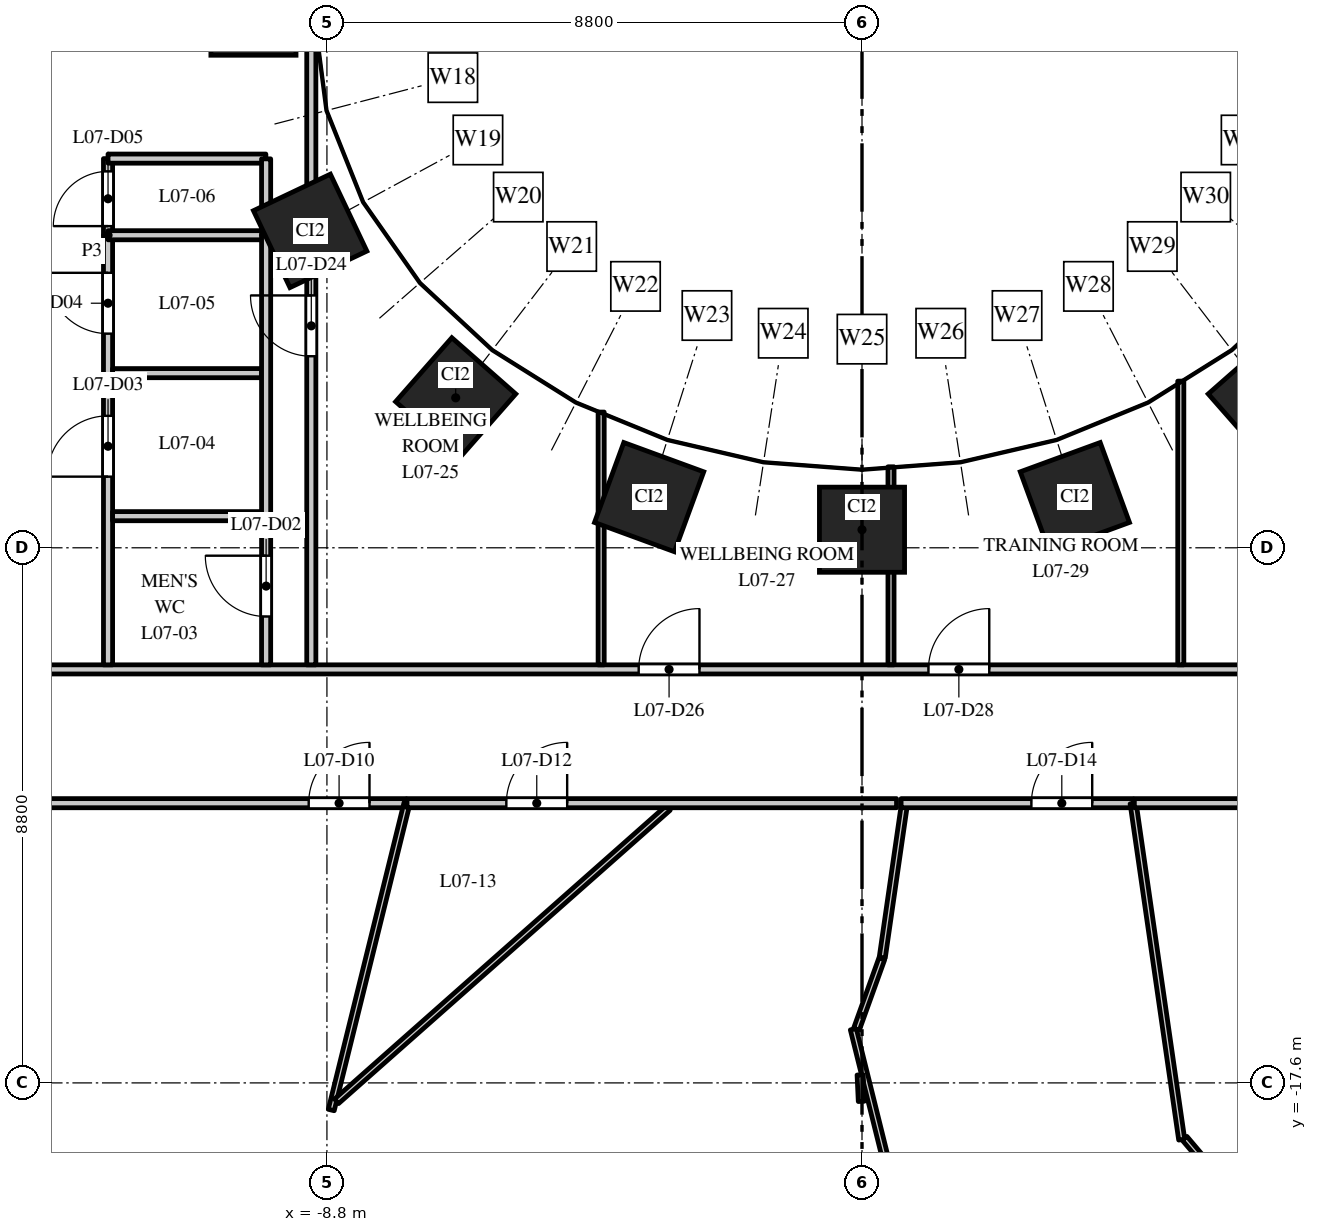
"""IFC4 building model, lengths in metres.
Left out: names, types, materials, properties, quantities, classifications, styles, units other than length and angle.
Written with IfcOpenShell. Run it as: python <this file> out.ifc"""

import sys

from ifc_helpers import new_model, si_unit, direction, frame, frame_2d, origin, origin_2d, place, context, subcontext, project, spatial, rectangle, extrude, element, fill, save


model = new_model("IFC4")
c1 = context("Model", 3, precision=1e-05, world=origin(), true_north=direction((0.0, 1.0)))
c2 = subcontext(c1, "Body", "Model", "MODEL_VIEW")
j1 = project(units=[si_unit("LENGTHUNIT", "METRE"), si_unit("PLANEANGLEUNIT", "RADIAN")], contexts=[c1])
p1 = place(None, origin())
s1 = spatial("IfcSite", under=j1, at=p1, CompositionType="ELEMENT")
p2 = place(p1, origin())
s2 = spatial("IfcBuilding", under=s1, at=p2, CompositionType="ELEMENT")
p3 = place(p2, frame((0.0, 0.0, 38.5)))
s3 = spatial("IfcBuildingStorey", under=s2, at=p3, CompositionType="ELEMENT", Elevation=38.5)
for number, where, z_axis, x_axis in (
    (1, (-10.008, 0.0, 0.0), (0.0, 0.0, 1.0), (0.0, -1.0, 0.0)),
    (2, (-9.076, -3.588, 0.0), (0.0, 0.0, 1.0), (0.429, -0.903, 0.0)),
    (3, (-6.682, -6.334, 0.0), (0.0, 0.0, 1.0), (0.751, -0.66, 0.0)),
    (4, (-3.501, -7.967, 0.0), (0.0, 0.0, 1.0), (0.939, -0.344, 0.0)),
    (5, (0.0, -8.503, 0.0), (0.0, 0.0, 1.0), (1.0, 0.0, 0.0)),
    (6, (3.501, -7.967, 0.0), (0.0, 0.0, 1.0), (0.939, 0.344, 0.0)),
    (7, (6.682, -6.334, 0.0), (0.0, 0.0, 1.0), (0.751, 0.66, 0.0)),
):
    element("IfcColumn", number, at=place(p3, frame(where, z_axis=z_axis, x_axis=x_axis)), inside=s3, PredefinedType="COLUMN", context=c2, shape_type="SweptSolid", body=[
        extrude(rectangle(XDim=1.4, YDim=1.4, at=origin_2d()), origin(), (0.0, 0.0, 1.0), 4.0),
    ])
p4 = place(p3, frame((-16.5, -13.0, 0.0), z_axis=(0.0, 0.0, 1.0), x_axis=(1.0, 0.0, 0.0)))
e8 = element("IfcWall", 8, at=p4, inside=s3, PredefinedType="PARTITIONING", context=c2, shape_type="SweptSolid", body=[
    extrude(rectangle(XDim=9.001, YDim=0.15, at=frame_2d((4.5, 0.0))), origin(), (0.0, 0.0, 1.0), 2.85),
])
p5 = place(p4, frame((7.4, 0.0, 0.0)))
e9 = element("IfcOpeningElement", 9, at=p5, cuts=e8, PredefinedType="OPENING", context=c2, shape_type="SweptSolid", body=[
    extrude(rectangle(XDim=1.0, YDim=2.1, at=frame_2d((0.5, 1.05))), frame((0.0, 0.085, 0.0), z_axis=(0.0, -1.0, 0.0), x_axis=(1.0, 0.0, 0.0)), (0.0, 0.0, 1.0), 0.17),
])
p6 = place(p3, frame((-14.3, -10.8, 0.0), z_axis=(0.0, 0.0, 1.0), x_axis=(1.0, 0.0, 0.0)))
e10 = element("IfcWall", 10, at=p6, inside=s3, PredefinedType="PARTITIONING", context=c2, shape_type="SweptSolid", body=[
    extrude(rectangle(XDim=28.6, YDim=0.15, at=frame_2d((14.3, 0.0))), origin(), (0.0, 0.0, 1.0), 2.85),
])
p7 = place(p6, frame((10.627, 0.0, 0.0)))
e11 = element("IfcOpeningElement", 11, at=p7, cuts=e10, PredefinedType="OPENING", context=c2, shape_type="SweptSolid", body=[
    extrude(rectangle(XDim=1.0, YDim=2.1, at=frame_2d((0.5, 1.05))), frame((0.0, 0.085, 0.0), z_axis=(0.0, -1.0, 0.0), x_axis=(1.0, 0.0, 0.0)), (0.0, 0.0, 1.0), 0.17),
])
p8 = place(p6, frame((15.393, 0.0, 0.0)))
e12 = element("IfcOpeningElement", 12, at=p8, cuts=e10, PredefinedType="OPENING", context=c2, shape_type="SweptSolid", body=[
    extrude(rectangle(XDim=1.0, YDim=2.1, at=frame_2d((0.5, 1.05))), frame((0.0, 0.085, 0.0), z_axis=(0.0, -1.0, 0.0), x_axis=(1.0, 0.0, 0.0)), (0.0, 0.0, 1.0), 0.17),
])
p9 = place(p3, frame((-12.4, -10.725, 0.0), z_axis=(0.0, 0.0, 1.0), x_axis=(0.0, 1.0, 0.0)))
e13 = element("IfcWall", 13, at=p9, inside=s3, PredefinedType="PARTITIONING", context=c2, shape_type="SweptSolid", body=[
    extrude(rectangle(XDim=7.065, YDim=0.15, at=frame_2d((3.533, 0.0))), origin(), (0.0, 0.0, 1.0), 2.75),
])
p10 = place(p9, frame((3.095, 0.0, 0.0)))
e14 = element("IfcOpeningElement", 14, at=p10, cuts=e13, PredefinedType="OPENING", context=c2, shape_type="SweptSolid", body=[
    extrude(rectangle(XDim=1.0, YDim=2.1, at=frame_2d((0.5, 1.05))), frame((0.0, 0.085, 0.0), z_axis=(0.0, -1.0, 0.0), x_axis=(1.0, 0.0, 0.0)), (0.0, 0.0, 1.0), 0.17),
])
p11 = place(p9, frame((5.447, 0.0, 0.0)))
e15 = element("IfcOpeningElement", 15, at=p11, cuts=e13, PredefinedType="OPENING", context=c2, shape_type="SweptSolid", body=[
    extrude(rectangle(XDim=1.0, YDim=2.1, at=frame_2d((0.5, 1.05))), frame((0.0, 0.085, 0.0), z_axis=(0.0, -1.0, 0.0), x_axis=(1.0, 0.0, 0.0)), (0.0, 0.0, 1.0), 0.17),
])
p12 = place(p3, frame((-12.325, -8.28, 0.0), z_axis=(0.0, 0.0, 1.0), x_axis=(1.0, 0.0, 0.0)))
e16 = element("IfcWall", 16, at=p12, inside=s3, PredefinedType="PARTITIONING", context=c2, shape_type="SweptSolid", body=[
    extrude(rectangle(XDim=2.45, YDim=0.15, at=frame_2d((1.225, 0.0))), origin(), (0.0, 0.0, 1.0), 2.75),
])
p13 = place(p3, frame((-12.325, -5.928, 0.0), z_axis=(0.0, 0.0, 1.0), x_axis=(1.0, 0.0, 0.0)))
e17 = element("IfcWall", 17, at=p13, inside=s3, PredefinedType="PARTITIONING", context=c2, shape_type="SweptSolid", body=[
    extrude(rectangle(XDim=2.45, YDim=0.15, at=frame_2d((1.225, 0.0))), origin(), (0.0, 0.0, 1.0), 3.7),
])
p14 = place(p3, frame((-12.4, -3.66, 0.0), z_axis=(0.0, 0.0, 1.0), x_axis=(0.0, 1.0, 0.0)))
e18 = element("IfcWall", 18, at=p14, inside=s3, PredefinedType="PARTITIONING", context=c2, shape_type="SweptSolid", body=[
    extrude(rectangle(XDim=1.26, YDim=0.15, at=frame_2d((0.63, 0.0))), origin(), (0.0, 0.0, 1.0), 3.7),
])
p15 = place(p14, frame((0.15, 0.0, 0.0)))
e19 = element("IfcOpeningElement", 19, at=p15, cuts=e18, PredefinedType="OPENING", context=c2, shape_type="SweptSolid", body=[
    extrude(rectangle(XDim=0.9, YDim=2.1, at=frame_2d((0.45, 1.05))), frame((0.0, 0.085, 0.0), z_axis=(0.0, -1.0, 0.0), x_axis=(1.0, 0.0, 0.0)), (0.0, 0.0, 1.0), 0.17),
])
p16 = place(p3, frame((-12.4, -3.66, 0.0), z_axis=(0.0, 0.0, 1.0), x_axis=(1.0, 0.0, 0.0)))
e20 = element("IfcWall", 20, at=p16, inside=s3, PredefinedType="PARTITIONING", context=c2, shape_type="SweptSolid", body=[
    extrude(rectangle(XDim=2.6, YDim=0.15, at=frame_2d((1.3, 0.0))), origin(), (0.0, 0.0, 1.0), 3.7),
])
p17 = place(p3, frame((-12.4, -2.4, 0.0), z_axis=(0.0, 0.0, 1.0), x_axis=(1.0, 0.0, 0.0)))
e21 = element("IfcWall", 21, at=p17, inside=s3, PredefinedType="PARTITIONING", context=c2, shape_type="SweptSolid", body=[
    extrude(rectangle(XDim=2.596, YDim=0.15, at=frame_2d((1.298, 0.0))), origin(), (0.0, 0.0, 1.0), 3.7),
])
p18 = place(p3, frame((-9.8, -10.725, 0.0), z_axis=(0.0, 0.0, 1.0), x_axis=(0.0, 1.0, 0.0)))
e22 = element("IfcWall", 22, at=p18, inside=s3, PredefinedType="PARTITIONING", context=c2, shape_type="SweptSolid", body=[
    extrude(rectangle(XDim=7.065, YDim=0.15, at=frame_2d((3.533, 0.0))), origin(), (0.0, 0.0, 1.0), 2.75),
])
p19 = place(p18, frame((0.795, 0.0, 0.0)))
e23 = element("IfcOpeningElement", 23, at=p19, cuts=e22, PredefinedType="OPENING", context=c2, shape_type="SweptSolid", body=[
    extrude(rectangle(XDim=1.0, YDim=2.1, at=frame_2d((0.5, 1.05))), frame((0.0, 0.085, 0.0), z_axis=(0.0, -1.0, 0.0), x_axis=(1.0, 0.0, 0.0)), (0.0, 0.0, 1.0), 0.17),
])
p20 = place(p3, frame((-9.8, -3.66, 0.0), z_axis=(0.0, 0.0, 1.0), x_axis=(0.0, 1.0, 0.0)))
e24 = element("IfcWall", 24, at=p20, inside=s3, PredefinedType="PARTITIONING", context=c2, shape_type="SweptSolid", body=[
    extrude(rectangle(XDim=1.256, YDim=0.15, at=frame_2d((0.628, 0.0))), origin(), (0.0, 0.0, 1.0), 3.7),
])
p21 = place(p3, frame((-9.057, -10.725, 0.0), z_axis=(0.0, 0.0, 1.0), x_axis=(0.0, 1.0, 0.0)))
e25 = element("IfcWall", 25, at=p21, inside=s3, PredefinedType="PARTITIONING", context=c2, shape_type="SweptSolid", body=[
    extrude(rectangle(XDim=10.68, YDim=0.15, at=frame_2d((5.34, 0.0))), origin(), (0.0, 0.0, 1.0), 2.75),
])
p22 = place(p21, frame((5.075, 0.0, 0.0)))
e26 = element("IfcOpeningElement", 26, at=p22, cuts=e25, PredefinedType="OPENING", context=c2, shape_type="SweptSolid", body=[
    extrude(rectangle(XDim=1.0, YDim=2.1, at=frame_2d((0.5, 1.05))), frame((0.0, 0.085, 0.0), z_axis=(0.0, -1.0, 0.0), x_axis=(1.0, 0.0, 0.0)), (0.0, 0.0, 1.0), 0.17),
])
p23 = place(p3, frame((-8.729, -18.046, 0.0), z_axis=(0.0, 0.0, 1.0), x_axis=(0.239749411988, 0.970834805439, 0.0)))
e27 = element("IfcWall", 27, at=p23, inside=s3, PredefinedType="PARTITIONING", context=c2, shape_type="SweptSolid", body=[
    extrude(rectangle(XDim=5.198, YDim=0.1, at=frame_2d((2.599, 0.0))), origin(), (0.0, 0.0, 1.0), 3.7),
])
p24 = place(p3, frame((-8.642, -17.903, 0.0), z_axis=(0.0, 0.0, 1.0), x_axis=(0.749027274438, 0.662539162728, 0.0)))
e28 = element("IfcWall", 28, at=p24, inside=s3, PredefinedType="PARTITIONING", context=c2, shape_type="SweptSolid", body=[
    extrude(rectangle(XDim=7.283, YDim=0.1, at=frame_2d((3.642, 0.0))), origin(), (0.0, 0.0, 1.0), 2.85),
])
p25 = place(p3, frame((-7.483, -13.0, 0.0), z_axis=(0.0, 0.0, 1.0), x_axis=(1.0, 0.0, 0.0)))
e29 = element("IfcWall", 29, at=p25, inside=s3, PredefinedType="PARTITIONING", context=c2, shape_type="SweptSolid", body=[
    extrude(rectangle(XDim=8.051, YDim=0.15, at=frame_2d((4.025, 0.0))), origin(), (0.0, 0.0, 1.0), 2.85),
])
p26 = place(p25, frame((1.634, 0.0, 0.0)))
e30 = element("IfcOpeningElement", 30, at=p26, cuts=e29, PredefinedType="OPENING", context=c2, shape_type="SweptSolid", body=[
    extrude(rectangle(XDim=1.0, YDim=2.1, at=frame_2d((0.5, 1.05))), frame((0.0, 0.085, 0.0), z_axis=(0.0, -1.0, 0.0), x_axis=(1.0, 0.0, 0.0)), (0.0, 0.0, 1.0), 0.17),
])
p27 = place(p3, frame((-4.29, -10.725, 0.0), z_axis=(0.0, 0.0, 1.0), x_axis=(0.0, 1.0, 0.0)))
e31 = element("IfcWall", 31, at=p27, inside=s3, PredefinedType="PARTITIONING", context=c2, shape_type="SweptSolid", body=[
    extrude(rectangle(XDim=4.157, YDim=0.1, at=frame_2d((2.079, 0.0))), origin(), (0.0, 0.0, 1.0), 2.85),
])
p28 = place(p3, frame((-0.143, -16.716, 0.0), z_axis=(0.0, 0.0, 1.0), x_axis=(0.24100876492, -0.970522939055, 0.0)))
e32 = element("IfcWall", 32, at=p28, inside=s3, PredefinedType="PARTITIONING", context=c2, shape_type="SweptSolid", body=[
    extrude(rectangle(XDim=11.477, YDim=0.1, at=frame_2d((5.739, 0.0))), origin(), (0.0, 0.0, 1.0), 2.85),
])
p29 = place(p3, frame((-0.091, -16.717, 0.0), z_axis=(0.0, 0.0, 1.0), x_axis=(0.338558024313, 0.940945516049, 0.0)))
e33 = element("IfcWall", 33, at=p29, inside=s3, PredefinedType="PARTITIONING", context=c2, shape_type="SweptSolid", body=[
    extrude(rectangle(XDim=1.232, YDim=0.1, at=frame_2d((0.616, 0.0))), origin(), (0.0, 0.0, 1.0), 3.7),
])
p30 = place(p3, frame((-0.031, -17.468, 0.0), z_axis=(0.0, 0.0, 1.0), x_axis=(0.045864339057, -0.99894767751, 0.0)))
e34 = element("IfcWall", 34, at=p30, inside=s3, PredefinedType="PARTITIONING", context=c2, shape_type="SweptSolid", body=[
    extrude(rectangle(XDim=0.437, YDim=0.1, at=frame_2d((0.218, 0.0))), origin(), (0.0, 0.0, 1.0), 3.7),
])
p31 = place(p3, frame((0.333, -15.539, 0.0), z_axis=(0.0, 0.0, 1.0), x_axis=(0.143115891067, 0.989705936996, 0.0)))
e35 = element("IfcWall", 35, at=p31, inside=s3, PredefinedType="PARTITIONING", context=c2, shape_type="SweptSolid", body=[
    extrude(rectangle(XDim=2.501, YDim=0.1, at=frame_2d((1.25, 0.0))), origin(), (0.0, 0.0, 1.0), 3.7),
])
p32 = place(p3, frame((0.477, -10.725, 0.0), z_axis=(0.0, 0.0, 1.0), x_axis=(0.0, 1.0, 0.0)))
e36 = element("IfcWall", 36, at=p32, inside=s3, PredefinedType="PARTITIONING", context=c2, shape_type="SweptSolid", body=[
    extrude(rectangle(XDim=3.257, YDim=0.1, at=frame_2d((1.628, 0.0))), origin(), (0.0, 0.0, 1.0), 2.85),
])
p33 = place(p3, frame((0.643, -13.0, 0.0), z_axis=(0.0, 0.0, 1.0), x_axis=(1.0, 0.0, 0.0)))
e37 = element("IfcWall", 37, at=p33, inside=s3, PredefinedType="PARTITIONING", context=c2, shape_type="SweptSolid", body=[
    extrude(rectangle(XDim=3.816, YDim=0.15, at=frame_2d((1.908, 0.0))), origin(), (0.0, 0.0, 1.0), 2.85),
])
p34 = place(p33, frame((2.143, 0.0, 0.0)))
e38 = element("IfcOpeningElement", 38, at=p34, cuts=e37, PredefinedType="OPENING", context=c2, shape_type="SweptSolid", body=[
    extrude(rectangle(XDim=1.0, YDim=2.1, at=frame_2d((0.5, 1.05))), frame((0.0, 0.085, 0.0), z_axis=(0.0, -1.0, 0.0), x_axis=(1.0, 0.0, 0.0)), (0.0, 0.0, 1.0), 0.17),
])
p35 = place(p3, frame((4.459, -13.004, 0.0), z_axis=(0.0, 0.0, 1.0), x_axis=(0.143036391033, -0.989717429795, 0.0)))
e39 = element("IfcWall", 39, at=p35, inside=s3, PredefinedType="PARTITIONING", context=c2, shape_type="SweptSolid", body=[
    extrude(rectangle(XDim=5.586, YDim=0.1, at=frame_2d((2.793, 0.0))), origin(), (0.0, 0.0, 1.0), 3.7),
])
p36 = place(p3, frame((4.479, -13.0, 0.0), z_axis=(0.0, 0.0, 1.0), x_axis=(1.0, 0.0, 0.0)))
e40 = element("IfcWall", 40, at=p36, inside=s3, PredefinedType="PARTITIONING", context=c2, shape_type="SweptSolid", body=[
    extrude(rectangle(XDim=3.568, YDim=0.15, at=frame_2d((1.784, 0.0))), origin(), (0.0, 0.0, 1.0), 2.85),
])
p37 = place(p36, frame((1.88, 0.0, 0.0)))
e41 = element("IfcOpeningElement", 41, at=p37, cuts=e40, PredefinedType="OPENING", context=c2, shape_type="SweptSolid", body=[
    extrude(rectangle(XDim=1.0, YDim=2.1, at=frame_2d((0.5, 1.05))), frame((0.0, 0.085, 0.0), z_axis=(0.0, -1.0, 0.0), x_axis=(1.0, 0.0, 0.0)), (0.0, 0.0, 1.0), 0.17),
])
p38 = place(p3, frame((5.243, -10.725, 0.0), z_axis=(0.0, 0.0, 1.0), x_axis=(0.0, 1.0, 0.0)))
e42 = element("IfcWall", 42, at=p38, inside=s3, PredefinedType="PARTITIONING", context=c2, shape_type="SweptSolid", body=[
    extrude(rectangle(XDim=4.666, YDim=0.1, at=frame_2d((2.333, 0.0))), origin(), (0.0, 0.0, 1.0), 2.85),
])
p39 = place(p3, frame((5.306, -18.512, 0.0), z_axis=(0.0, 0.0, 1.0), x_axis=(0.646500054355, -0.762913939917, 0.0)))
e43 = element("IfcWall", 43, at=p39, inside=s3, PredefinedType="PARTITIONING", context=c2, shape_type="SweptSolid", body=[
    extrude(rectangle(XDim=10.239, YDim=0.1, at=frame_2d((5.119, 0.0))), origin(), (0.0, 0.0, 1.0), 2.85),
])
p40 = place(p19, origin())
e44 = element("IfcDoor", 44, at=p40, inside=s3, OperationType="SINGLE_SWING_RIGHT", PredefinedType="DOOR", context=c2, shape_type="SweptSolid", body=[
    extrude(rectangle(XDim=1.0, YDim=2.1, at=frame_2d((0.5, 1.05))), frame((0.0, 0.025, 0.0), z_axis=(0.0, -1.0, 0.0), x_axis=(1.0, 0.0, 0.0)), (0.0, 0.0, 1.0), 0.05),
])
fill(e23, e44)
p41 = place(p10, origin())
e45 = element("IfcDoor", 45, at=p41, inside=s3, OperationType="SINGLE_SWING_LEFT", PredefinedType="DOOR", context=c2, shape_type="SweptSolid", body=[
    extrude(rectangle(XDim=1.0, YDim=2.1, at=frame_2d((0.5, 1.05))), frame((0.0, 0.025, 0.0), z_axis=(0.0, -1.0, 0.0), x_axis=(1.0, 0.0, 0.0)), (0.0, 0.0, 1.0), 0.05),
])
fill(e14, e45)
p42 = place(p11, origin())
e46 = element("IfcDoor", 46, at=p42, inside=s3, OperationType="SINGLE_SWING_RIGHT", PredefinedType="DOOR", context=c2, shape_type="SweptSolid", body=[
    extrude(rectangle(XDim=1.0, YDim=2.1, at=frame_2d((0.5, 1.05))), frame((0.0, 0.025, 0.0), z_axis=(0.0, -1.0, 0.0), x_axis=(1.0, 0.0, 0.0)), (0.0, 0.0, 1.0), 0.05),
])
fill(e15, e46)
p43 = place(p15, origin())
e47 = element("IfcDoor", 47, at=p43, inside=s3, OperationType="SINGLE_SWING_LEFT", PredefinedType="DOOR", context=c2, shape_type="SweptSolid", body=[
    extrude(rectangle(XDim=0.9, YDim=2.1, at=frame_2d((0.45, 1.05))), frame((0.0, 0.025, 0.0), z_axis=(0.0, -1.0, 0.0), x_axis=(1.0, 0.0, 0.0)), (0.0, 0.0, 1.0), 0.05),
])
fill(e19, e47)
p44 = place(p5, origin())
e48 = element("IfcDoor", 48, at=p44, inside=s3, OperationType="SINGLE_SWING_RIGHT", PredefinedType="DOOR", context=c2, shape_type="SweptSolid", body=[
    extrude(rectangle(XDim=1.0, YDim=2.1, at=frame_2d((0.5, 1.05))), frame((0.0, 0.025, 0.0), z_axis=(0.0, -1.0, 0.0), x_axis=(1.0, 0.0, 0.0)), (0.0, 0.0, 1.0), 0.05),
])
fill(e9, e48)
p45 = place(p26, origin())
e49 = element("IfcDoor", 49, at=p45, inside=s3, OperationType="SINGLE_SWING_RIGHT", PredefinedType="DOOR", context=c2, shape_type="SweptSolid", body=[
    extrude(rectangle(XDim=1.0, YDim=2.1, at=frame_2d((0.5, 1.05))), frame((0.0, 0.025, 0.0), z_axis=(0.0, -1.0, 0.0), x_axis=(1.0, 0.0, 0.0)), (0.0, 0.0, 1.0), 0.05),
])
fill(e30, e49)
p46 = place(p34, origin())
e50 = element("IfcDoor", 50, at=p46, inside=s3, OperationType="SINGLE_SWING_RIGHT", PredefinedType="DOOR", context=c2, shape_type="SweptSolid", body=[
    extrude(rectangle(XDim=1.0, YDim=2.1, at=frame_2d((0.5, 1.05))), frame((0.0, 0.025, 0.0), z_axis=(0.0, -1.0, 0.0), x_axis=(1.0, 0.0, 0.0)), (0.0, 0.0, 1.0), 0.05),
])
fill(e38, e50)
p47 = place(p22, origin())
e51 = element("IfcDoor", 51, at=p47, inside=s3, OperationType="SINGLE_SWING_RIGHT", PredefinedType="DOOR", context=c2, shape_type="SweptSolid", body=[
    extrude(rectangle(XDim=1.0, YDim=2.1, at=frame_2d((0.5, 1.05))), frame((0.0, 0.025, 0.0), z_axis=(0.0, -1.0, 0.0), x_axis=(1.0, 0.0, 0.0)), (0.0, 0.0, 1.0), 0.05),
])
fill(e26, e51)
p48 = place(p7, origin())
e52 = element("IfcDoor", 52, at=p48, inside=s3, OperationType="SINGLE_SWING_RIGHT", PredefinedType="DOOR", context=c2, shape_type="SweptSolid", body=[
    extrude(rectangle(XDim=1.0, YDim=2.1, at=frame_2d((0.5, 1.05))), frame((0.0, 0.025, 0.0), z_axis=(0.0, -1.0, 0.0), x_axis=(1.0, 0.0, 0.0)), (0.0, 0.0, 1.0), 0.05),
])
fill(e11, e52)
p49 = place(p8, origin())
e53 = element("IfcDoor", 53, at=p49, inside=s3, OperationType="SINGLE_SWING_RIGHT", PredefinedType="DOOR", context=c2, shape_type="SweptSolid", body=[
    extrude(rectangle(XDim=1.0, YDim=2.1, at=frame_2d((0.5, 1.05))), frame((0.0, 0.025, 0.0), z_axis=(0.0, -1.0, 0.0), x_axis=(1.0, 0.0, 0.0)), (0.0, 0.0, 1.0), 0.05),
])
fill(e12, e53)
save(model, sys.argv[1])
